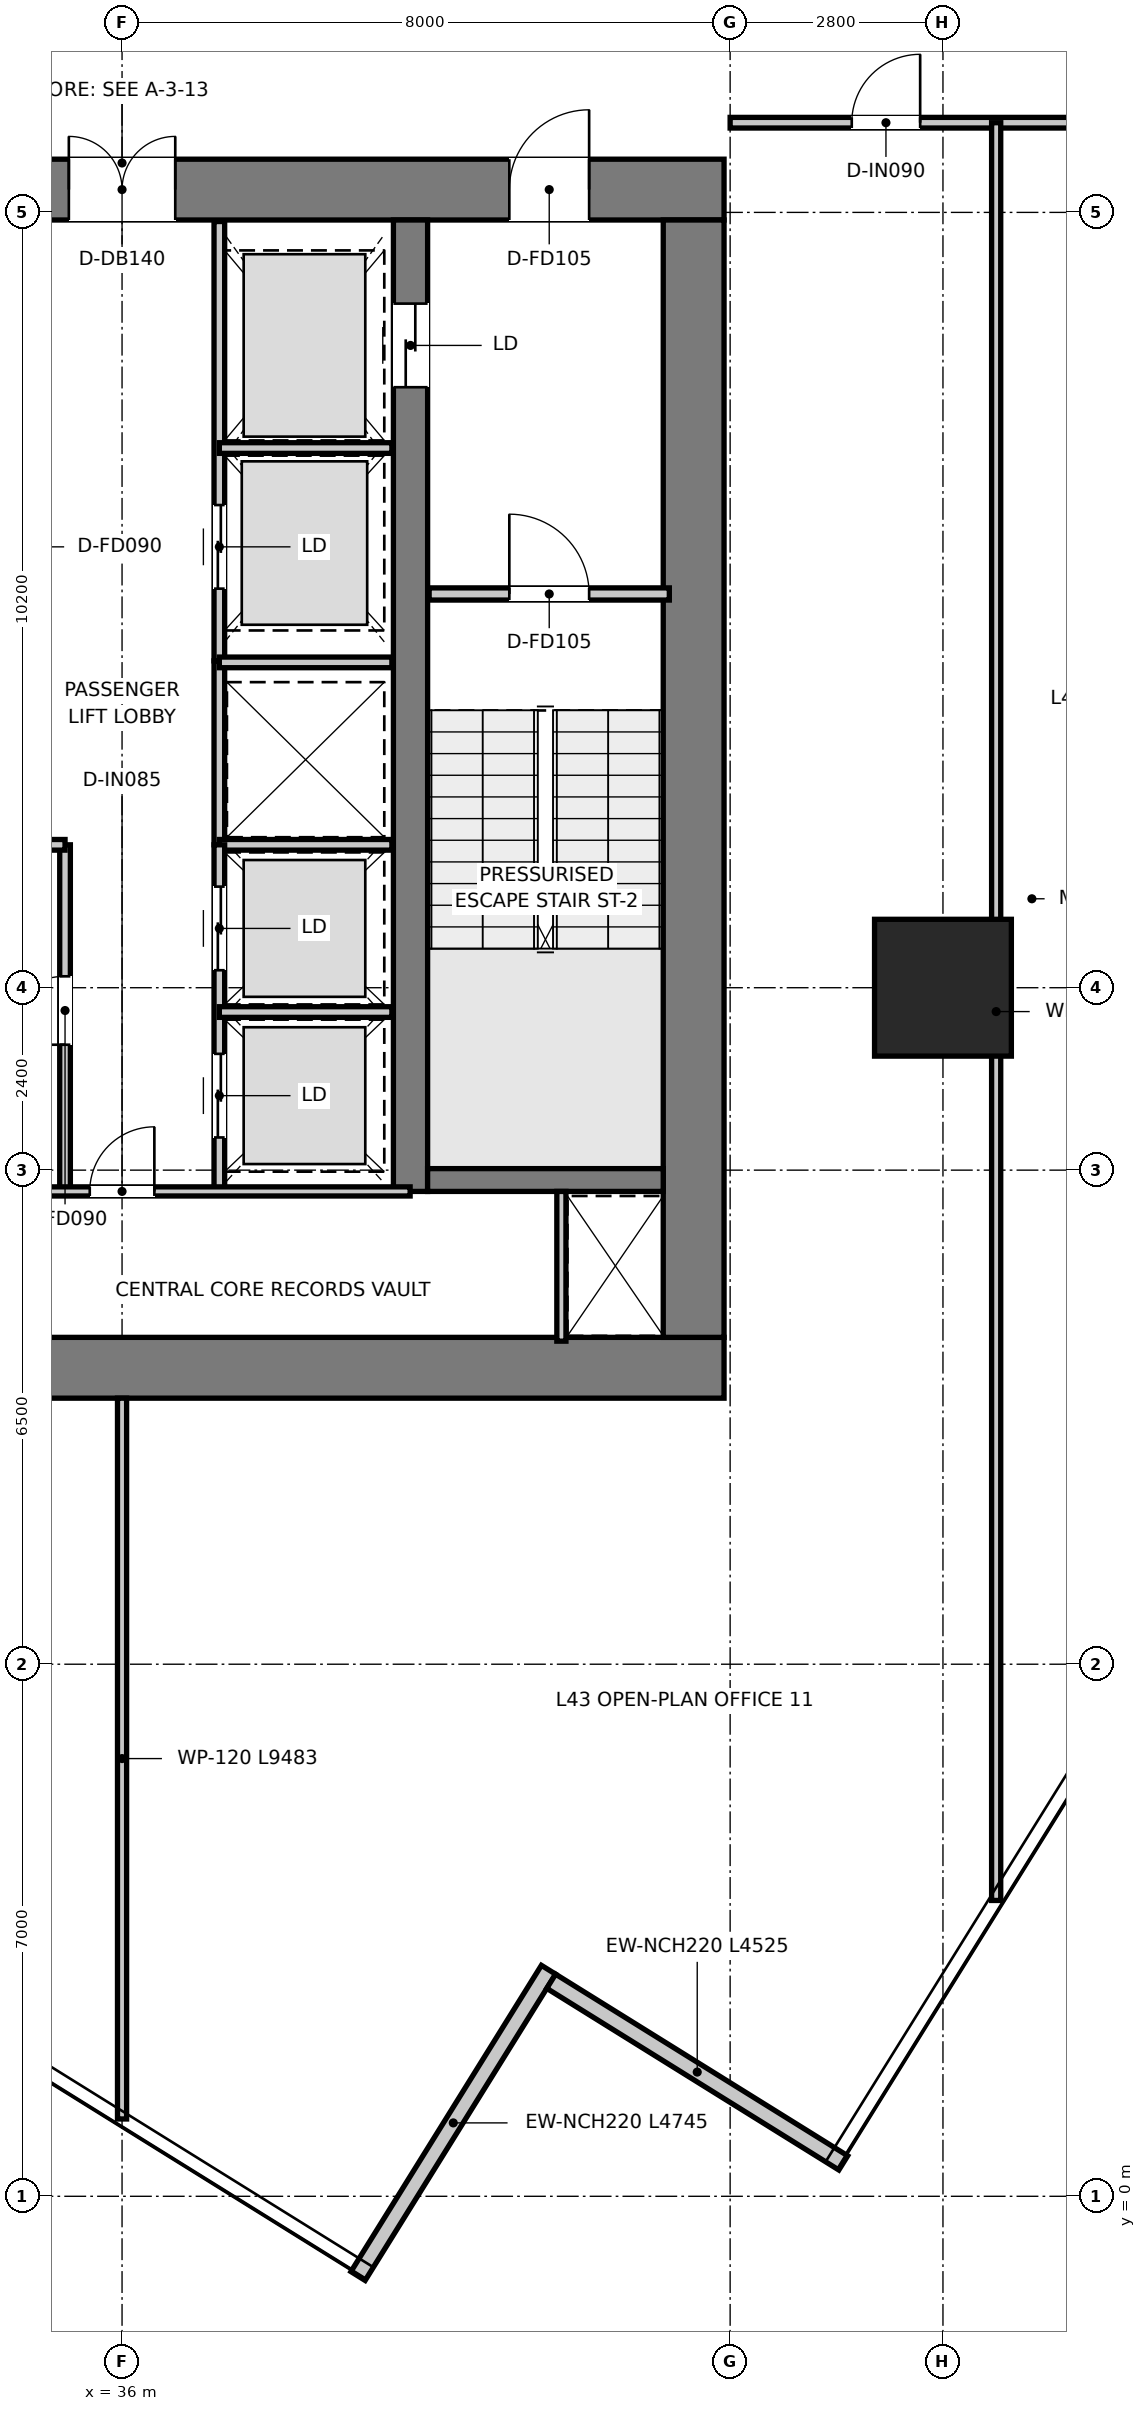
"""IFC4 building model, lengths in metres.
Left out: names, types, materials, properties, quantities, classifications, styles, units other than length and angle.
Written with IfcOpenShell. Run it as: python <this file> out.ifc"""

import sys

from ifc_helpers import new_model, si_unit, direction, frame, frame_2d, origin, origin_2d, place, context, subcontext, project, spatial, rectangle, extrude, source, transform, mapped, element, fill, save


model = new_model("IFC4")
c1 = context("Model", 3, precision=1e-05, world=origin(), true_north=direction((0.0, 1.0)))
c2 = subcontext(c1, "Body", "Model", "MODEL_VIEW")
j1 = project(units=[si_unit("LENGTHUNIT", "METRE"), si_unit("PLANEANGLEUNIT", "RADIAN")], contexts=[c1])
p1 = place(None, origin())
s1 = spatial("IfcSite", under=j1, at=p1, CompositionType="ELEMENT")
p2 = place(p1, origin())
s2 = spatial("IfcBuilding", under=s1, at=p2, CompositionType="ELEMENT")
p3 = place(p2, frame((0.0, 0.0, 177.8)))
s3 = spatial("IfcBuildingStorey", under=s2, at=p3, CompositionType="ELEMENT", Elevation=177.8)
p4 = place(p3, frame((28.08, 10.9, 0.0), z_axis=(0.0, 0.0, 1.0), x_axis=(1.0, 0.0, 0.0)))
e1 = element("IfcWall", 1, at=p4, inside=s3, PredefinedType="SHEAR", context=c2, shape_type="SweptSolid", body=[
    extrude(rectangle(XDim=15.84, YDim=0.8, at=frame_2d((7.92, 0.0))), origin(), (0.0, 0.0, 1.0), 3.95),
])
p5 = place(p3, frame((28.08, 26.4, 0.0), z_axis=(0.0, 0.0, 1.0), x_axis=(1.0, 0.0, 0.0)))
e2 = element("IfcWall", 2, at=p5, inside=s3, PredefinedType="SHEAR", context=c2, shape_type="SweptSolid", body=[
    extrude(rectangle(XDim=15.84, YDim=0.8, at=frame_2d((7.92, 0.0))), origin(), (0.0, 0.0, 1.0), 3.95),
])
p6 = place(p5, frame((7.22, 0.0, 0.0)))
e3 = element("IfcOpeningElement", 3, at=p6, cuts=e2, PredefinedType="OPENING", context=c2, shape_type="SweptSolid", body=[
    extrude(rectangle(XDim=1.4, YDim=2.2, at=frame_2d((0.7, 1.1))), frame((0.0, 0.41, 0.0), z_axis=(0.0, -1.0, 0.0), x_axis=(1.0, 0.0, 0.0)), (0.0, 0.0, 1.0), 0.82),
])
p7 = place(p5, frame((1.775, 0.0, 0.0)))
e4 = element("IfcOpeningElement", 4, at=p7, cuts=e2, PredefinedType="OPENING", context=c2, shape_type="SweptSolid", body=[
    extrude(rectangle(XDim=1.05, YDim=2.1, at=frame_2d((0.525, 1.05))), frame((0.0, 0.41, 0.0), z_axis=(0.0, -1.0, 0.0), x_axis=(1.0, 0.0, 0.0)), (0.0, 0.0, 1.0), 0.82),
])
p8 = place(p5, frame((13.015, 0.0, 0.0)))
e5 = element("IfcOpeningElement", 5, at=p8, cuts=e2, PredefinedType="OPENING", context=c2, shape_type="SweptSolid", body=[
    extrude(rectangle(XDim=1.05, YDim=2.1, at=frame_2d((0.525, 1.05))), frame((0.0, 0.41, 0.0), z_axis=(0.0, -1.0, 0.0), x_axis=(1.0, 0.0, 0.0)), (0.0, 0.0, 1.0), 0.82),
])
p9 = place(p3, frame((43.52, 11.3, 0.0), z_axis=(0.0, 0.0, 1.0), x_axis=(0.0, 1.0, 0.0)))
e6 = element("IfcWall", 6, at=p9, inside=s3, PredefinedType="SHEAR", context=c2, shape_type="SweptSolid", body=[
    extrude(rectangle(XDim=14.7, YDim=0.8, at=frame_2d((7.35, 0.0))), origin(), (0.0, 0.0, 1.0), 3.95),
])
p10 = place(p3, frame((39.795, 13.22, 0.0), z_axis=(0.0, 0.0, 1.0), x_axis=(0.0, 1.0, 0.0)))
e7 = element("IfcWall", 7, at=p10, inside=s3, PredefinedType="SHEAR", context=c2, shape_type="SweptSolid", body=[
    extrude(rectangle(XDim=12.78, YDim=0.45, at=frame_2d((6.39, 0.0))), origin(), (0.0, 0.0, 1.0), 3.95),
])
p11 = place(p10, frame((10.58, 0.0, 0.0)))
e8 = element("IfcOpeningElement", 8, at=p11, cuts=e7, PredefinedType="OPENING", context=c2, shape_type="SweptSolid", body=[
    extrude(rectangle(XDim=1.1, YDim=2.15, at=frame_2d((0.55, 1.075))), frame((0.0, 0.235, 0.0), z_axis=(0.0, -1.0, 0.0), x_axis=(1.0, 0.0, 0.0)), (0.0, 0.0, 1.0), 0.47),
])
p12 = place(p3, frame((40.02, 13.37, 0.0), z_axis=(0.0, 0.0, 1.0), x_axis=(1.0, 0.0, 0.0)))
e9 = element("IfcWall", 9, at=p12, inside=s3, PredefinedType="SHEAR", context=c2, shape_type="SweptSolid", body=[
    extrude(rectangle(XDim=3.1, YDim=0.3, at=frame_2d((1.55, 0.0))), origin(), (0.0, 0.0, 1.0), 3.95),
])
m1 = source(origin(), c2, "Body", "SweptSolid", [
    extrude(rectangle(XDim=1.8, YDim=1.8, at=origin_2d()), origin(), (0.0, 0.0, 1.0), 3.95),
])
p13 = place(p3, frame((46.8, 15.9, 0.0), z_axis=(0.0, 0.0, 1.0), x_axis=(1.0, 0.0, 0.0)))
e10 = element("IfcColumn", 10, at=p13, inside=s3, PredefinedType="USERDEFINED", context=c2, shape_type="MappedRepresentation", body=[
    mapped(m1, transform((0.0, 0.0, 0.0), x_axis=(1.0, 0.0, 0.0), y_axis=(0.0, 1.0, 0.0), z_axis=(0.0, 0.0, 1.0), scale=1.0)),
])
p14 = place(p3, frame((39.105, -1.049, 0.0), z_axis=(0.0, 0.0, 1.0), x_axis=(0.528087569346, 0.849189919336, 0.0)))
e11 = element("IfcWall", 11, at=p14, inside=s3, PredefinedType="ELEMENTEDWALL", context=c2, shape_type="SweptSolid", body=[
    extrude(rectangle(XDim=4.745, YDim=0.22, at=frame_2d((2.373, 0.0))), origin(), (0.0, 0.0, 1.0), 3.67),
])
p15 = place(p3, frame((41.646, 2.829, 0.0), z_axis=(0.0, 0.0, 1.0), x_axis=(0.849220592333, -0.528038242514, 0.0)))
e12 = element("IfcWall", 12, at=p15, inside=s3, PredefinedType="ELEMENTEDWALL", context=c2, shape_type="SweptSolid", body=[
    extrude(rectangle(XDim=4.525, YDim=0.22, at=frame_2d((2.263, 0.0))), origin(), (0.0, 0.0, 1.0), 3.67),
])
p16 = place(p3, frame((40.04, 21.08, 0.0), z_axis=(0.0, 0.0, 1.0), x_axis=(1.0, 0.0, 0.0)))
e13 = element("IfcWall", 13, at=p16, inside=s3, PredefinedType="PARTITIONING", context=c2, shape_type="SweptSolid", body=[
    extrude(rectangle(XDim=3.16, YDim=0.16, at=frame_2d((1.58, 0.0))), origin(), (0.0, 0.0, 1.0), 3.67),
])
p17 = place(p16, frame((1.055, 0.0, 0.0)))
e14 = element("IfcOpeningElement", 14, at=p17, cuts=e13, PredefinedType="OPENING", context=c2, shape_type="SweptSolid", body=[
    extrude(rectangle(XDim=1.05, YDim=2.1, at=frame_2d((0.525, 1.05))), frame((0.0, 0.09, 0.0), z_axis=(0.0, -1.0, 0.0), x_axis=(1.0, 0.0, 0.0)), (0.0, 0.0, 1.0), 0.18),
])
p18 = place(p3, frame((37.28, 20.2, 0.0), z_axis=(0.0, 0.0, 1.0), x_axis=(0.0, 1.0, 0.0)))
e15 = element("IfcWall", 15, at=p18, inside=s3, PredefinedType="PARTITIONING", context=c2, shape_type="SweptSolid", body=[
    extrude(rectangle(XDim=5.78, YDim=0.14, at=frame_2d((2.89, 0.0))), origin(), (0.0, 0.0, 1.0), 2.67),
])
p19 = place(p18, frame((0.95, 0.0, 0.0)))
e16 = element("IfcOpeningElement", 16, at=p19, cuts=e15, PredefinedType="OPENING", context=c2, shape_type="SweptSolid", body=[
    extrude(rectangle(XDim=1.1, YDim=2.15, at=frame_2d((0.55, 1.075))), frame((0.0, 0.08, 0.0), z_axis=(0.0, -1.0, 0.0), x_axis=(1.0, 0.0, 0.0)), (0.0, 0.0, 1.0), 0.16),
])
p20 = place(p3, frame((37.28, 23.0, 0.0), z_axis=(0.0, 0.0, 1.0), x_axis=(1.0, 0.0, 0.0)))
e17 = element("IfcWall", 17, at=p20, inside=s3, PredefinedType="PARTITIONING", context=c2, shape_type="SweptSolid", body=[
    extrude(rectangle(XDim=2.27, YDim=0.14, at=frame_2d((1.135, 0.0))), origin(), (0.0, 0.0, 1.0), 2.67),
])
p21 = place(p3, frame((37.28, 17.78, 0.0), z_axis=(0.0, 0.0, 1.0), x_axis=(0.0, 1.0, 0.0)))
e18 = element("IfcWall", 18, at=p21, inside=s3, PredefinedType="PARTITIONING", context=c2, shape_type="SweptSolid", body=[
    extrude(rectangle(XDim=2.42, YDim=0.14, at=frame_2d((1.21, 0.0))), origin(), (0.0, 0.0, 1.0), 3.67),
])
for number, where, z_axis, x_axis in (
    (19, (37.28, 17.78, 0.0), (0.0, 0.0, 1.0), (1.0, 0.0, 0.0)),
    (20, (37.28, 20.18, 0.0), (0.0, 0.0, 1.0), (1.0, 0.0, 0.0)),
):
    element("IfcWall", number, at=place(p3, frame(where, z_axis=z_axis, x_axis=x_axis)), inside=s3, PredefinedType="PARTITIONING", context=c2, shape_type="SweptSolid", body=[
        extrude(rectangle(XDim=2.27, YDim=0.14, at=frame_2d((1.135, 0.0))), origin(), (0.0, 0.0, 1.0), 3.67),
    ])
p22 = place(p3, frame((35.25, 13.22, 0.0), z_axis=(0.0, 0.0, 1.0), x_axis=(0.0, 1.0, 0.0)))
e21 = element("IfcWall", 21, at=p22, inside=s3, PredefinedType="PARTITIONING", context=c2, shape_type="SweptSolid", body=[
    extrude(rectangle(XDim=4.56, YDim=0.14, at=frame_2d((2.28, 0.0))), origin(), (0.0, 0.0, 1.0), 3.67),
])
p23 = place(p22, frame((1.93, 0.0, 0.0)))
e22 = element("IfcOpeningElement", 22, at=p23, cuts=e21, PredefinedType="OPENING", context=c2, shape_type="SweptSolid", body=[
    extrude(rectangle(XDim=0.9, YDim=2.1, at=frame_2d((0.45, 1.05))), frame((0.0, 0.08, 0.0), z_axis=(0.0, -1.0, 0.0), x_axis=(1.0, 0.0, 0.0)), (0.0, 0.0, 1.0), 0.16),
])
p24 = place(p3, frame((34.72, 17.78, 0.0), z_axis=(0.0, 0.0, 1.0), x_axis=(1.0, 0.0, 0.0)))
e23 = element("IfcWall", 23, at=p24, inside=s3, PredefinedType="PARTITIONING", context=c2, shape_type="SweptSolid", body=[
    extrude(rectangle(XDim=0.53, YDim=0.14, at=frame_2d((0.265, 0.0))), origin(), (0.0, 0.0, 1.0), 3.67),
])
p25 = place(p3, frame((37.28, 13.22, 0.0), z_axis=(0.0, 0.0, 1.0), x_axis=(0.0, 1.0, 0.0)))
e24 = element("IfcWall", 24, at=p25, inside=s3, PredefinedType="PARTITIONING", context=c2, shape_type="SweptSolid", body=[
    extrude(rectangle(XDim=4.56, YDim=0.14, at=frame_2d((2.28, 0.0))), origin(), (0.0, 0.0, 1.0), 3.67),
])
p26 = place(p25, frame((0.71, 0.0, 0.0)))
e25 = element("IfcOpeningElement", 25, at=p26, cuts=e24, PredefinedType="OPENING", context=c2, shape_type="SweptSolid", body=[
    extrude(rectangle(XDim=1.1, YDim=2.15, at=frame_2d((0.55, 1.075))), frame((0.0, 0.08, 0.0), z_axis=(0.0, -1.0, 0.0), x_axis=(1.0, 0.0, 0.0)), (0.0, 0.0, 1.0), 0.16),
])
p27 = place(p25, frame((2.91, 0.0, 0.0)))
e26 = element("IfcOpeningElement", 26, at=p27, cuts=e24, PredefinedType="OPENING", context=c2, shape_type="SweptSolid", body=[
    extrude(rectangle(XDim=1.1, YDim=2.15, at=frame_2d((0.55, 1.075))), frame((0.0, 0.08, 0.0), z_axis=(0.0, -1.0, 0.0), x_axis=(1.0, 0.0, 0.0)), (0.0, 0.0, 1.0), 0.16),
])
p28 = place(p3, frame((37.28, 15.58, 0.0), z_axis=(0.0, 0.0, 1.0), x_axis=(1.0, 0.0, 0.0)))
e27 = element("IfcWall", 27, at=p28, inside=s3, PredefinedType="PARTITIONING", context=c2, shape_type="SweptSolid", body=[
    extrude(rectangle(XDim=2.27, YDim=0.14, at=frame_2d((1.135, 0.0))), origin(), (0.0, 0.0, 1.0), 3.67),
])
p29 = place(p3, frame((41.78, 11.25, 0.0), z_axis=(0.0, 0.0, 1.0), x_axis=(0.0, 1.0, 0.0)))
e28 = element("IfcWall", 28, at=p29, inside=s3, PredefinedType="PARTITIONING", context=c2, shape_type="SweptSolid", body=[
    extrude(rectangle(XDim=1.97, YDim=0.12, at=frame_2d((0.985, 0.0))), origin(), (0.0, 0.0, 1.0), 3.67),
])
p30 = place(p3, frame((32.21, 13.22, 0.0), z_axis=(0.0, 0.0, 1.0), x_axis=(1.0, 0.0, 0.0)))
e29 = element("IfcWall", 29, at=p30, inside=s3, PredefinedType="PARTITIONING", context=c2, shape_type="SweptSolid", body=[
    extrude(rectangle(XDim=7.58, YDim=0.12, at=frame_2d((3.79, 0.0))), origin(), (0.0, 0.0, 1.0), 3.67),
])
p31 = place(p30, frame((3.365, 0.0, 0.0)))
e30 = element("IfcOpeningElement", 30, at=p31, cuts=e29, PredefinedType="OPENING", context=c2, shape_type="SweptSolid", body=[
    extrude(rectangle(XDim=0.85, YDim=2.1, at=frame_2d((0.425, 1.05))), frame((0.0, 0.07, 0.0), z_axis=(0.0, -1.0, 0.0), x_axis=(1.0, 0.0, 0.0)), (0.0, 0.0, 1.0), 0.14),
])
p32 = place(p3, frame((44.0, 27.28, 0.0), z_axis=(0.0, 0.0, 1.0), x_axis=(1.0, 0.0, 0.0)))
e31 = element("IfcWall", 31, at=p32, inside=s3, PredefinedType="PARTITIONING", context=c2, shape_type="SweptSolid", body=[
    extrude(rectangle(XDim=18.044, YDim=0.14, at=frame_2d((9.022, 0.0))), origin(), (0.0, 0.0, 1.0), 3.03),
])
p33 = place(p32, frame((1.6, 0.0, 0.0)))
e32 = element("IfcOpeningElement", 32, at=p33, cuts=e31, PredefinedType="OPENING", context=c2, shape_type="SweptSolid", body=[
    extrude(rectangle(XDim=0.9, YDim=2.1, at=frame_2d((0.45, 1.05))), frame((0.0, 0.08, 0.0), z_axis=(0.0, -1.0, 0.0), x_axis=(1.0, 0.0, 0.0)), (0.0, 0.0, 1.0), 0.16),
])
p34 = place(p32, frame((4.75, 0.0, 0.0)))
e33 = element("IfcOpeningElement", 33, at=p34, cuts=e31, PredefinedType="OPENING", context=c2, shape_type="SweptSolid", body=[
    extrude(rectangle(XDim=0.9, YDim=2.1, at=frame_2d((0.45, 1.05))), frame((0.0, 0.08, 0.0), z_axis=(0.0, -1.0, 0.0), x_axis=(1.0, 0.0, 0.0)), (0.0, 0.0, 1.0), 0.16),
])
p35 = place(p32, frame((13.191, 0.0, 0.0)))
e34 = element("IfcOpeningElement", 34, at=p35, cuts=e31, PredefinedType="OPENING", context=c2, shape_type="SweptSolid", body=[
    extrude(rectangle(XDim=0.9, YDim=2.1, at=frame_2d((0.45, 1.05))), frame((0.0, 0.08, 0.0), z_axis=(0.0, -1.0, 0.0), x_axis=(1.0, 0.0, 0.0)), (0.0, 0.0, 1.0), 0.16),
])
p36 = place(p3, frame((36.0, 1.017, 0.0), z_axis=(0.0, 0.0, 1.0), x_axis=(0.0, 1.0, 0.0)))
e35 = element("IfcWall", 35, at=p36, inside=s3, PredefinedType="PARTITIONING", context=c2, shape_type="SweptSolid", body=[
    extrude(rectangle(XDim=9.483, YDim=0.12, at=frame_2d((4.741, 0.0))), origin(), (0.0, 0.0, 1.0), 3.67),
])
p37 = place(p3, frame((47.5, 3.892, 0.0), z_axis=(0.0, 0.0, 1.0), x_axis=(0.0, 1.0, 0.0)))
e36 = element("IfcWall", 36, at=p37, inside=s3, PredefinedType="PARTITIONING", context=c2, shape_type="SweptSolid", body=[
    extrude(rectangle(XDim=23.388, YDim=0.12, at=frame_2d((11.694, 0.0))), origin(), (0.0, 0.0, 1.0), 3.08),
])
p38 = place(p17, origin())
e37 = element("IfcDoor", 37, at=p38, inside=s3, OperationType="SINGLE_SWING_LEFT", PredefinedType="DOOR", context=c2, shape_type="SweptSolid", body=[
    extrude(rectangle(XDim=1.05, YDim=2.1, at=frame_2d((0.525, 1.05))), frame((0.0, 0.025, 0.0), z_axis=(0.0, -1.0, 0.0), x_axis=(1.0, 0.0, 0.0)), (0.0, 0.0, 1.0), 0.05),
])
fill(e14, e37)
p39 = place(p6, origin())
e38 = element("IfcDoor", 38, at=p39, inside=s3, OperationType="DOUBLE_DOOR_SINGLE_SWING", PredefinedType="DOOR", context=c2, shape_type="SweptSolid", body=[
    extrude(rectangle(XDim=1.4, YDim=2.2, at=frame_2d((0.7, 1.1))), frame((0.0, 0.025, 0.0), z_axis=(0.0, -1.0, 0.0), x_axis=(1.0, 0.0, 0.0)), (0.0, 0.0, 1.0), 0.05),
])
fill(e3, e38)
p40 = place(p8, origin())
e39 = element("IfcDoor", 39, at=p40, inside=s3, OperationType="SINGLE_SWING_RIGHT", PredefinedType="DOOR", context=c2, shape_type="SweptSolid", body=[
    extrude(rectangle(XDim=1.05, YDim=2.1, at=frame_2d((0.525, 1.05))), frame((0.0, 0.025, 0.0), z_axis=(0.0, -1.0, 0.0), x_axis=(1.0, 0.0, 0.0)), (0.0, 0.0, 1.0), 0.05),
])
fill(e5, e39)
p41 = place(p11, origin())
e40 = element("IfcDoor", 40, at=p41, inside=s3, OperationType="DOUBLE_DOOR_SLIDING", PredefinedType="DOOR", context=c2, shape_type="SweptSolid", body=[
    extrude(rectangle(XDim=1.1, YDim=2.15, at=frame_2d((0.55, 1.075))), frame((0.0, 0.025, 0.0), z_axis=(0.0, -1.0, 0.0), x_axis=(1.0, 0.0, 0.0)), (0.0, 0.0, 1.0), 0.05),
])
fill(e8, e40)
p42 = place(p19, origin())
e41 = element("IfcDoor", 41, at=p42, inside=s3, OperationType="DOUBLE_DOOR_SLIDING", PredefinedType="DOOR", context=c2, shape_type="SweptSolid", body=[
    extrude(rectangle(XDim=1.1, YDim=2.15, at=frame_2d((0.55, 1.075))), frame((0.0, 0.025, 0.0), z_axis=(0.0, -1.0, 0.0), x_axis=(1.0, 0.0, 0.0)), (0.0, 0.0, 1.0), 0.05),
])
fill(e16, e41)
p43 = place(p23, origin())
e42 = element("IfcDoor", 42, at=p43, inside=s3, OperationType="SINGLE_SWING_LEFT", PredefinedType="DOOR", context=c2, shape_type="SweptSolid", body=[
    extrude(rectangle(XDim=0.9, YDim=2.1, at=frame_2d((0.45, 1.05))), frame((0.0, 0.025, 0.0), z_axis=(0.0, -1.0, 0.0), x_axis=(1.0, 0.0, 0.0)), (0.0, 0.0, 1.0), 0.05),
])
fill(e22, e42)
p44 = place(p26, origin())
e43 = element("IfcDoor", 43, at=p44, inside=s3, OperationType="DOUBLE_DOOR_SLIDING", PredefinedType="DOOR", context=c2, shape_type="SweptSolid", body=[
    extrude(rectangle(XDim=1.1, YDim=2.15, at=frame_2d((0.55, 1.075))), frame((0.0, 0.025, 0.0), z_axis=(0.0, -1.0, 0.0), x_axis=(1.0, 0.0, 0.0)), (0.0, 0.0, 1.0), 0.05),
])
fill(e25, e43)
p45 = place(p27, origin())
e44 = element("IfcDoor", 44, at=p45, inside=s3, OperationType="DOUBLE_DOOR_SLIDING", PredefinedType="DOOR", context=c2, shape_type="SweptSolid", body=[
    extrude(rectangle(XDim=1.1, YDim=2.15, at=frame_2d((0.55, 1.075))), frame((0.0, 0.025, 0.0), z_axis=(0.0, -1.0, 0.0), x_axis=(1.0, 0.0, 0.0)), (0.0, 0.0, 1.0), 0.05),
])
fill(e26, e44)
p46 = place(p31, origin())
e45 = element("IfcDoor", 45, at=p46, inside=s3, OperationType="SINGLE_SWING_RIGHT", PredefinedType="DOOR", context=c2, shape_type="SweptSolid", body=[
    extrude(rectangle(XDim=0.85, YDim=2.1, at=frame_2d((0.425, 1.05))), frame((0.0, 0.025, 0.0), z_axis=(0.0, -1.0, 0.0), x_axis=(1.0, 0.0, 0.0)), (0.0, 0.0, 1.0), 0.05),
])
fill(e30, e45)
p47 = place(p33, origin())
e46 = element("IfcDoor", 46, at=p47, inside=s3, OperationType="SINGLE_SWING_RIGHT", PredefinedType="DOOR", context=c2, shape_type="SweptSolid", body=[
    extrude(rectangle(XDim=0.9, YDim=2.1, at=frame_2d((0.45, 1.05))), frame((0.0, 0.025, 0.0), z_axis=(0.0, -1.0, 0.0), x_axis=(1.0, 0.0, 0.0)), (0.0, 0.0, 1.0), 0.05),
])
fill(e32, e46)
save(model, sys.argv[1])
